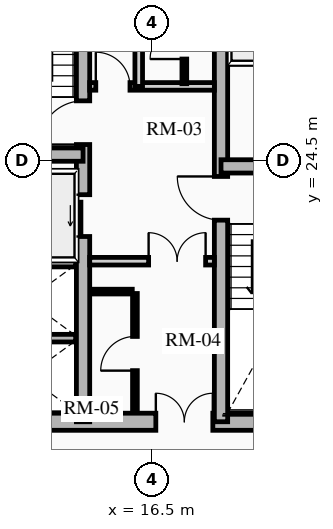
"""IFC4 building model, lengths in metres.
Left out: names, types, materials, properties, quantities, classifications, styles, units other than length and angle.
Written with IfcOpenShell. Run it as: python <this file> out.ifc"""

import sys

from ifc_helpers import new_model, si_unit, direction, frame, frame_2d, origin, place, context, subcontext, project, spatial, rectangle, extrude, source, transform, mapped, element, fill, save


model = new_model("IFC4")
c1 = context("Model", 3, precision=1e-05, world=origin(), true_north=direction((0.0, 1.0)))
c2 = subcontext(c1, "Body", "Model", "MODEL_VIEW")
j1 = project(units=[si_unit("LENGTHUNIT", "METRE"), si_unit("PLANEANGLEUNIT", "RADIAN")], contexts=[c1])
p1 = place(None, origin())
s1 = spatial("IfcSite", under=j1, at=p1, CompositionType="ELEMENT")
p2 = place(p1, origin())
s2 = spatial("IfcBuilding", under=s1, at=p2, CompositionType="ELEMENT")
p3 = place(p2, frame((0.0, 0.0, 84.7)))
s3 = spatial("IfcBuildingStorey", under=s2, at=p3, CompositionType="ELEMENT", Elevation=84.7)
p4 = place(p3, frame((11.15, 17.625, 0.0), z_axis=(0.0, 0.0, 1.0), x_axis=(1.0, 0.0, 0.0)))
e1 = element("IfcWall", 1, at=p4, inside=s3, PredefinedType="SHEAR", context=c2, shape_type="SweptSolid", body=[
    extrude(rectangle(XDim=10.7, YDim=0.45, at=frame_2d((5.35, 0.0))), origin(), (0.0, 0.0, 1.0), 2.91),
])
m1 = source(origin(), c2, "Body", "SweptSolid", [
    extrude(rectangle(XDim=1.5, YDim=2.02, at=frame_2d((0.75, 1.01))), frame((0.0, 0.235, 0.0), z_axis=(0.0, -1.0, 0.0), x_axis=(1.0, 0.0, 0.0)), (0.0, 0.0, 1.0), 0.47),
])
p5 = place(p4, frame((5.45, 0.0, 0.0)))
e2 = element("IfcOpeningElement", 2, at=p5, cuts=e1, PredefinedType="OPENING", context=c2, shape_type="MappedRepresentation", body=[
    mapped(m1, transform((0.0, 0.0, 0.0), x_axis=(1.0, 0.0, 0.0), y_axis=(0.0, 1.0, 0.0), z_axis=(0.0, 0.0, 1.0), scale=1.0)),
])
p6 = place(p3, frame((14.685, 17.625, 0.0), z_axis=(0.0, 0.0, 1.0), x_axis=(0.0, 1.0, 0.0)))
e3 = element("IfcWall", 3, at=p6, inside=s3, PredefinedType="SHEAR", context=c2, shape_type="SweptSolid", body=[
    extrude(rectangle(XDim=13.75, YDim=0.35, at=frame_2d((6.875, 0.0))), origin(), (0.0, 0.0, 1.0), 2.91),
])
m2 = source(origin(), c2, "Body", "SweptSolid", [
    extrude(rectangle(XDim=1.1, YDim=2.015, at=frame_2d((0.55, 1.007))), frame((0.0, 0.185, 0.0), z_axis=(0.0, -1.0, 0.0), x_axis=(1.0, 0.0, 0.0)), (0.0, 0.0, 1.0), 0.37),
])
p7 = place(p6, frame((4.875, 0.0, 0.0)))
e4 = element("IfcOpeningElement", 4, at=p7, cuts=e3, PredefinedType="OPENING", context=c2, shape_type="MappedRepresentation", body=[
    mapped(m2, transform((0.0, 0.0, 0.0), x_axis=(1.0, 0.0, 0.0), y_axis=(0.0, 1.0, 0.0), z_axis=(0.0, 0.0, 1.0), scale=1.0)),
])
m3 = source(origin(), c2, "Body", "SweptSolid", [
    extrude(rectangle(XDim=1.15, YDim=2.02, at=frame_2d((0.575, 1.01))), frame((0.0, 0.185, 0.0), z_axis=(0.0, -1.0, 0.0), x_axis=(1.0, 0.0, 0.0)), (0.0, 0.0, 1.0), 0.37),
])
p8 = place(p6, frame((7.295, 0.0, 0.0)))
e5 = element("IfcOpeningElement", 5, at=p8, cuts=e3, PredefinedType="OPENING", context=c2, shape_type="MappedRepresentation", body=[
    mapped(m3, transform((0.0, 0.0, 0.0), x_axis=(1.0, 0.0, 0.0), y_axis=(0.0, 1.0, 0.0), z_axis=(0.0, 0.0, 1.0), scale=1.0)),
])
p9 = place(p3, frame((18.315, 17.625, 0.0), z_axis=(0.0, 0.0, 1.0), x_axis=(0.0, 1.0, 0.0)))
e6 = element("IfcWall", 6, at=p9, inside=s3, PredefinedType="SHEAR", context=c2, shape_type="SweptSolid", body=[
    extrude(rectangle(XDim=13.75, YDim=0.35, at=frame_2d((6.875, 0.0))), origin(), (0.0, 0.0, 1.0), 2.91),
])
p10 = place(p9, frame((10.0, 0.0, 0.0)))
e7 = element("IfcOpeningElement", 7, at=p10, cuts=e6, PredefinedType="OPENING", context=c2, shape_type="MappedRepresentation", body=[
    mapped(m2, transform((0.0, 0.0, 0.0), x_axis=(1.0, 0.0, 0.0), y_axis=(0.0, 1.0, 0.0), z_axis=(0.0, 0.0, 1.0), scale=1.0)),
])
p11 = place(p9, frame((12.0, 0.0, 0.0)))
e8 = element("IfcOpeningElement", 8, at=p11, cuts=e6, PredefinedType="OPENING", context=c2, shape_type="MappedRepresentation", body=[
    mapped(m2, transform((0.0, 0.0, 0.0), x_axis=(1.0, 0.0, 0.0), y_axis=(0.0, 1.0, 0.0), z_axis=(0.0, 0.0, 1.0), scale=1.0)),
])
p12 = place(p9, frame((5.305, 0.0, 0.0)))
e9 = element("IfcOpeningElement", 9, at=p12, cuts=e6, PredefinedType="OPENING", context=c2, shape_type="MappedRepresentation", body=[
    mapped(m3, transform((0.0, 0.0, 0.0), x_axis=(1.0, 0.0, 0.0), y_axis=(0.0, 1.0, 0.0), z_axis=(0.0, 0.0, 1.0), scale=1.0)),
])
for number, where, z_axis, x_axis in (
    (10, (11.4, 24.655, 0.0), (0.0, 0.0, 1.0), (1.0, 0.0, 0.0)),
    (11, (18.315, 24.345, 0.0), (0.0, 0.0, 1.0), (1.0, 0.0, 0.0)),
):
    element("IfcWall", number, at=place(p3, frame(where, z_axis=z_axis, x_axis=x_axis)), inside=s3, PredefinedType="SHEAR", context=c2, shape_type="SweptSolid", body=[
        extrude(rectangle(XDim=3.285, YDim=0.35, at=frame_2d((1.643, 0.0))), origin(), (0.0, 0.0, 1.0), 2.91),
    ])
for number, where, z_axis, x_axis in (
    (12, (11.52, 21.8, 0.0), (0.0, 0.0, 1.0), (1.0, 0.0, 0.0)),
    (13, (11.52, 19.825, 0.0), (0.0, 0.0, 1.0), (1.0, 0.0, 0.0)),
    (14, (18.51, 27.13, 0.0), (0.0, 0.0, 1.0), (1.0, 0.0, 0.0)),
):
    element("IfcWall", number, at=place(p3, frame(where, z_axis=z_axis, x_axis=x_axis)), inside=s3, PredefinedType="SHEAR", context=c2, shape_type="SweptSolid", body=[
        extrude(rectangle(XDim=2.97, YDim=0.2, at=frame_2d((1.485, 0.0))), origin(), (0.0, 0.0, 1.0), 2.91),
    ])
p13 = place(p3, frame((14.86, 21.85, 0.0), z_axis=(0.0, 0.0, 1.0), x_axis=(1.0, 0.0, 0.0)))
e15 = element("IfcWall", 15, at=p13, inside=s3, PredefinedType="PARTITIONING", context=c2, shape_type="SweptSolid", body=[
    extrude(rectangle(XDim=3.28, YDim=0.2, at=frame_2d((1.64, 0.0))), origin(), (0.0, 0.0, 1.0), 2.655),
])
m4 = source(origin(), c2, "Body", "SweptSolid", [
    extrude(rectangle(XDim=1.5, YDim=2.02, at=frame_2d((0.75, 1.01))), frame((0.0, 0.11, 0.0), z_axis=(0.0, -1.0, 0.0), x_axis=(1.0, 0.0, 0.0)), (0.0, 0.0, 1.0), 0.22),
])
p14 = place(p13, frame((1.55, 0.0, 0.0)))
e16 = element("IfcOpeningElement", 16, at=p14, cuts=e15, PredefinedType="OPENING", context=c2, shape_type="MappedRepresentation", body=[
    mapped(m4, transform((0.0, 0.0, 0.0), x_axis=(1.0, 0.0, 0.0), y_axis=(0.0, 1.0, 0.0), z_axis=(0.0, 0.0, 1.0), scale=1.0)),
])
p15 = place(p3, frame((14.86, 26.45, 0.0), z_axis=(0.0, 0.0, 1.0), x_axis=(1.0, 0.0, 0.0)))
e17 = element("IfcWall", 17, at=p15, inside=s3, PredefinedType="PARTITIONING", context=c2, shape_type="SweptSolid", body=[
    extrude(rectangle(XDim=3.28, YDim=0.2, at=frame_2d((1.64, 0.0))), origin(), (0.0, 0.0, 1.0), 2.655),
])
m5 = source(origin(), c2, "Body", "SweptSolid", [
    extrude(rectangle(XDim=0.9, YDim=2.005, at=frame_2d((0.45, 1.002))), frame((0.0, 0.11, 0.0), z_axis=(0.0, -1.0, 0.0), x_axis=(1.0, 0.0, 0.0)), (0.0, 0.0, 1.0), 0.22),
])
p16 = place(p15, frame((0.16, 0.0, 0.0)))
e18 = element("IfcOpeningElement", 18, at=p16, cuts=e17, PredefinedType="OPENING", context=c2, shape_type="MappedRepresentation", body=[
    mapped(m5, transform((0.0, 0.0, 0.0), x_axis=(1.0, 0.0, 0.0), y_axis=(0.0, 1.0, 0.0), z_axis=(0.0, 0.0, 1.0), scale=1.0)),
])
p17 = place(p3, frame((16.15, 26.45, 0.0), z_axis=(0.0, 0.0, 1.0), x_axis=(0.0, 1.0, 0.0)))
e19 = element("IfcWall", 19, at=p17, inside=s3, PredefinedType="PARTITIONING", context=c2, shape_type="SweptSolid", body=[
    extrude(rectangle(XDim=2.4, YDim=0.2, at=frame_2d((1.2, 0.0))), origin(), (0.0, 0.0, 1.0), 2.655),
])
p18 = place(p3, frame((16.05, 17.92, 0.0), z_axis=(0.0, 0.0, 1.0), x_axis=(0.0, 1.0, 0.0)))
e20 = element("IfcWall", 20, at=p18, inside=s3, PredefinedType="PARTITIONING", context=c2, shape_type="SweptSolid", body=[
    extrude(rectangle(XDim=3.08, YDim=0.125, at=frame_2d((1.54, 0.0))), origin(), (0.0, 0.0, 1.0), 2.655),
])
m6 = source(origin(), c2, "Body", "SweptSolid", [
    extrude(rectangle(XDim=0.9, YDim=2.005, at=frame_2d((0.45, 1.002))), frame((0.0, 0.073, 0.0), z_axis=(0.0, -1.0, 0.0), x_axis=(1.0, 0.0, 0.0)), (0.0, 0.0, 1.0), 0.145),
])
p19 = place(p18, frame((1.05, 0.0, 0.0)))
e21 = element("IfcOpeningElement", 21, at=p19, cuts=e20, PredefinedType="OPENING", context=c2, shape_type="MappedRepresentation", body=[
    mapped(m6, transform((0.0, 0.0, 0.0), x_axis=(1.0, 0.0, 0.0), y_axis=(0.0, 1.0, 0.0), z_axis=(0.0, 0.0, 1.0), scale=1.0)),
])
p20 = place(p3, frame((14.88, 21.05, 0.0), z_axis=(0.0, 0.0, 1.0), x_axis=(1.0, 0.0, 0.0)))
e22 = element("IfcWall", 22, at=p20, inside=s3, PredefinedType="PARTITIONING", context=c2, shape_type="SweptSolid", body=[
    extrude(rectangle(XDim=1.1, YDim=0.125, at=frame_2d((0.55, 0.0))), origin(), (0.0, 0.0, 1.0), 2.655),
])
p21 = place(p3, frame((17.35, 26.52, 0.0), z_axis=(0.0, 0.0, 1.0), x_axis=(0.0, 1.0, 0.0)))
e23 = element("IfcWall", 23, at=p21, inside=s3, PredefinedType="PARTITIONING", context=c2, shape_type="SweptSolid", body=[
    extrude(rectangle(XDim=2.26, YDim=0.125, at=frame_2d((1.13, 0.0))), origin(), (0.0, 0.0, 1.0), 2.655),
])
p22 = place(p21, frame((0.65, 0.0, 0.0)))
e24 = element("IfcOpeningElement", 24, at=p22, cuts=e23, PredefinedType="OPENING", context=c2, shape_type="MappedRepresentation", body=[
    mapped(m6, transform((0.0, 0.0, 0.0), x_axis=(1.0, 0.0, 0.0), y_axis=(0.0, 1.0, 0.0), z_axis=(0.0, 0.0, 1.0), scale=1.0)),
])
m7 = source(origin(), c2, "Body", "SweptSolid", [
    extrude(rectangle(XDim=1.1, YDim=2.015, at=frame_2d((0.55, 1.007))), frame((0.0, 0.025, 0.0), z_axis=(0.0, -1.0, 0.0), x_axis=(1.0, 0.0, 0.0)), (0.0, 0.0, 1.0), 0.05),
])
p23 = place(p7, origin())
e25 = element("IfcDoor", 25, at=p23, inside=s3, OperationType="SLIDING_TO_LEFT", PredefinedType="DOOR", context=c2, shape_type="MappedRepresentation", body=[
    mapped(m7, transform((0.0, 0.0, 0.0), x_axis=(1.0, 0.0, 0.0), y_axis=(0.0, 1.0, 0.0), z_axis=(0.0, 0.0, 1.0), scale=1.0)),
])
fill(e4, e25)
m8 = source(origin(), c2, "Body", "SweptSolid", [
    extrude(rectangle(XDim=1.15, YDim=2.02, at=frame_2d((0.575, 1.01))), frame((0.0, 0.025, 0.0), z_axis=(0.0, -1.0, 0.0), x_axis=(1.0, 0.0, 0.0)), (0.0, 0.0, 1.0), 0.05),
])
p24 = place(p8, origin())
e26 = element("IfcDoor", 26, at=p24, inside=s3, OperationType="SINGLE_SWING_LEFT", PredefinedType="DOOR", context=c2, shape_type="MappedRepresentation", body=[
    mapped(m8, transform((0.0, 0.0, 0.0), x_axis=(1.0, 0.0, 0.0), y_axis=(0.0, 1.0, 0.0), z_axis=(0.0, 0.0, 1.0), scale=1.0)),
])
fill(e5, e26)
p25 = place(p12, origin())
e27 = element("IfcDoor", 27, at=p25, inside=s3, OperationType="SINGLE_SWING_RIGHT", PredefinedType="DOOR", context=c2, shape_type="MappedRepresentation", body=[
    mapped(m8, transform((0.0, 0.0, 0.0), x_axis=(1.0, 0.0, 0.0), y_axis=(0.0, 1.0, 0.0), z_axis=(0.0, 0.0, 1.0), scale=1.0)),
])
fill(e9, e27)
m9 = source(origin(), c2, "Body", "SweptSolid", [
    extrude(rectangle(XDim=1.5, YDim=2.02, at=frame_2d((0.75, 1.01))), frame((0.0, 0.025, 0.0), z_axis=(0.0, -1.0, 0.0), x_axis=(1.0, 0.0, 0.0)), (0.0, 0.0, 1.0), 0.05),
])
p26 = place(p5, origin())
e28 = element("IfcDoor", 28, at=p26, inside=s3, OperationType="DOUBLE_DOOR_SINGLE_SWING", PredefinedType="DOOR", context=c2, shape_type="MappedRepresentation", body=[
    mapped(m9, transform((0.0, 0.0, 0.0), x_axis=(1.0, 0.0, 0.0), y_axis=(0.0, 1.0, 0.0), z_axis=(0.0, 0.0, 1.0), scale=1.0)),
])
fill(e2, e28)
p27 = place(p14, origin())
e29 = element("IfcDoor", 29, at=p27, inside=s3, OperationType="DOUBLE_DOOR_SINGLE_SWING", PredefinedType="DOOR", context=c2, shape_type="MappedRepresentation", body=[
    mapped(m9, transform((0.0, 0.0, 0.0), x_axis=(1.0, 0.0, 0.0), y_axis=(0.0, 1.0, 0.0), z_axis=(0.0, 0.0, 1.0), scale=1.0)),
])
fill(e16, e29)
m10 = source(origin(), c2, "Body", "SweptSolid", [
    extrude(rectangle(XDim=0.9, YDim=2.005, at=frame_2d((0.45, 1.002))), frame((0.0, 0.025, 0.0), z_axis=(0.0, -1.0, 0.0), x_axis=(1.0, 0.0, 0.0)), (0.0, 0.0, 1.0), 0.05),
])
p28 = place(p16, origin())
e30 = element("IfcDoor", 30, at=p28, inside=s3, OperationType="SINGLE_SWING_LEFT", PredefinedType="DOOR", context=c2, shape_type="MappedRepresentation", body=[
    mapped(m10, transform((0.0, 0.0, 0.0), x_axis=(1.0, 0.0, 0.0), y_axis=(0.0, 1.0, 0.0), z_axis=(0.0, 0.0, 1.0), scale=1.0)),
])
fill(e18, e30)
p29 = place(p19, origin())
e31 = element("IfcDoor", 31, at=p29, inside=s3, OperationType="SINGLE_SWING_LEFT", PredefinedType="DOOR", context=c2, shape_type="MappedRepresentation", body=[
    mapped(m10, transform((0.0, 0.0, 0.0), x_axis=(1.0, 0.0, 0.0), y_axis=(0.0, 1.0, 0.0), z_axis=(0.0, 0.0, 1.0), scale=1.0)),
])
fill(e21, e31)
p30 = place(p22, origin())
e32 = element("IfcDoor", 32, at=p30, inside=s3, OperationType="SINGLE_SWING_LEFT", PredefinedType="DOOR", context=c2, shape_type="MappedRepresentation", body=[
    mapped(m10, transform((0.0, 0.0, 0.0), x_axis=(1.0, 0.0, 0.0), y_axis=(0.0, 1.0, 0.0), z_axis=(0.0, 0.0, 1.0), scale=1.0)),
])
fill(e24, e32)
save(model, sys.argv[1])
